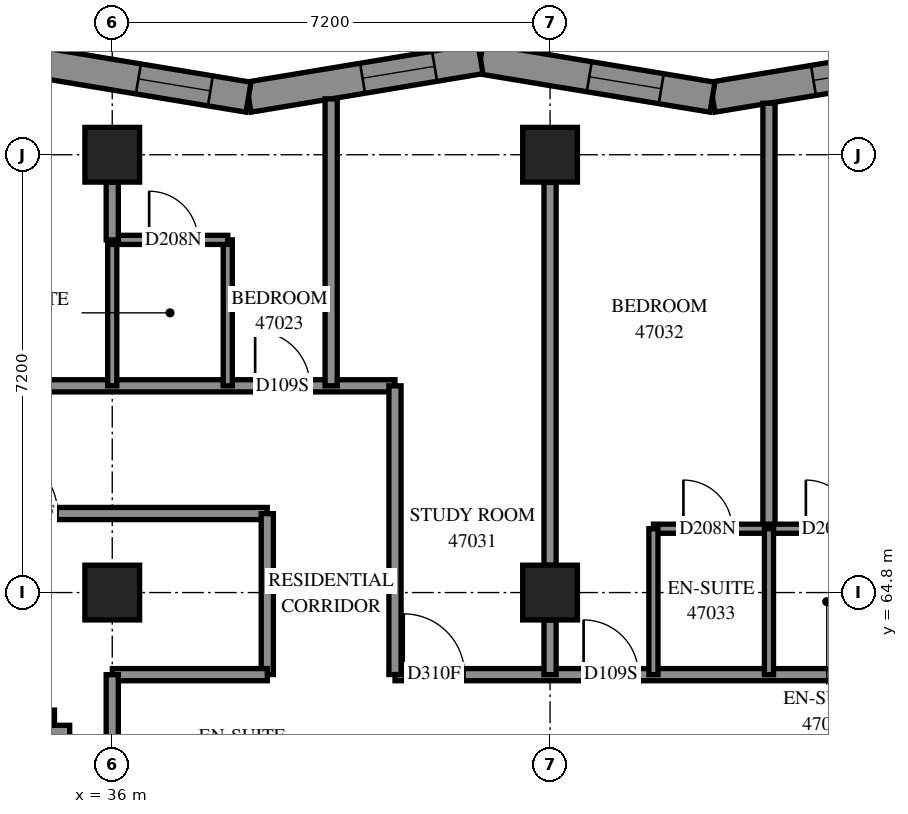
"""IFC4 building model, lengths in metres.
Left out: names, types, materials, properties, quantities, classifications, styles, units other than length and angle.
Written with IfcOpenShell. Run it as: python <this file> out.ifc"""

import sys

from ifc_helpers import new_model, si_unit, direction, frame, frame_2d, origin, origin_2d, place, context, subcontext, project, spatial, polyline, rectangle, outline, extrude, element, fill, save


model = new_model("IFC4")
c1 = context("Model", 3, precision=1e-05, world=origin(), true_north=direction((0.0, 1.0)))
c2 = subcontext(c1, "Body", "Model", "MODEL_VIEW")
j1 = project(units=[si_unit("LENGTHUNIT", "METRE"), si_unit("PLANEANGLEUNIT", "RADIAN")], contexts=[c1])
p1 = place(None, origin())
s1 = spatial("IfcSite", under=j1, at=p1, CompositionType="ELEMENT")
p2 = place(p1, origin())
s2 = spatial("IfcBuilding", under=s1, at=p2, CompositionType="ELEMENT")
p3 = place(p2, frame((0.0, 0.0, 172.8)))
s3 = spatial("IfcBuildingStorey", under=s2, at=p3, CompositionType="ELEMENT", Elevation=172.8)
for number, where, z_axis, x_axis in (
    (1, (36.0, 64.8, 0.0), (0.0, 0.0, 1.0), (1.0, 0.0, 0.0)),
    (2, (36.0, 72.0, 0.0), (0.0, 0.0, 1.0), (1.0, 0.0, 0.0)),
    (3, (43.2, 64.8, 0.0), (0.0, 0.0, 1.0), (1.0, 0.0, 0.0)),
    (4, (43.2, 72.0, 0.0), (0.0, 0.0, 1.0), (1.0, 0.0, 0.0)),
):
    element("IfcColumn", number, at=place(p3, frame(where, z_axis=z_axis, x_axis=x_axis)), inside=s3, PredefinedType="COLUMN", context=c2, shape_type="SweptSolid", body=[
        extrude(rectangle(XDim=0.9, YDim=0.9, at=origin_2d()), origin(), (0.0, 0.0, 1.0), 3.1),
    ])
p4 = place(p3, frame((49.685, 73.58, 0.0), z_axis=(0.0, 0.0, 1.0), x_axis=(-0.9865110911, -0.1636944324, 0.0)))
e5 = element("IfcWall", 5, at=p4, inside=s3, PredefinedType="SOLIDWALL", context=c2, shape_type="SweptSolid", body=[
    extrude(outline(polyline([(-0.042, -0.25), (3.825, -0.25), (3.908, 0.25), (0.042, 0.25), (-0.042, -0.25)])), origin(), (0.0, 0.0, 1.0), 3.1),
])
p5 = place(p4, frame((0.983, 0.0, 0.45)))
e6 = element("IfcOpeningElement", 6, at=p5, cuts=e5, PredefinedType="OPENING", context=c2, shape_type="SweptSolid", body=[
    extrude(rectangle(XDim=1.2, YDim=2.5, at=frame_2d((0.6, 1.25))), frame((0.0, 0.26, 0.0), z_axis=(0.0, -1.0, 0.0), x_axis=(1.0, 0.0, 0.0)), (0.0, 0.0, 1.0), 0.52),
])
p6 = place(p3, frame((45.87, 72.947, 0.0), z_axis=(0.0, 0.0, 1.0), x_axis=(-0.9865110911, 0.1636944324, 0.0)))
e7 = element("IfcWall", 7, at=p6, inside=s3, PredefinedType="SOLIDWALL", context=c2, shape_type="SweptSolid", body=[
    extrude(outline(polyline([(0.042, -0.25), (3.908, -0.25), (3.825, 0.25), (-0.042, 0.25), (0.042, -0.25)])), origin(), (0.0, 0.0, 1.0), 3.1),
])
p7 = place(p6, frame((0.854, 0.0, 0.45)))
e8 = element("IfcOpeningElement", 8, at=p7, cuts=e7, PredefinedType="OPENING", context=c2, shape_type="SweptSolid", body=[
    extrude(rectangle(XDim=1.2, YDim=2.5, at=frame_2d((0.6, 1.25))), frame((0.0, 0.26, 0.0), z_axis=(0.0, -1.0, 0.0), x_axis=(1.0, 0.0, 0.0)), (0.0, 0.0, 1.0), 0.52),
])
p8 = place(p3, frame((42.056, 73.58, 0.0), z_axis=(0.0, 0.0, 1.0), x_axis=(-0.9865110911, -0.1636944324, 0.0)))
e9 = element("IfcWall", 9, at=p8, inside=s3, PredefinedType="SOLIDWALL", context=c2, shape_type="SweptSolid", body=[
    extrude(outline(polyline([(-0.042, -0.25), (3.825, -0.25), (3.908, 0.25), (0.042, 0.25), (-0.042, -0.25)])), origin(), (0.0, 0.0, 1.0), 3.1),
])
p9 = place(p8, frame((0.765, 0.0, 0.45)))
e10 = element("IfcOpeningElement", 10, at=p9, cuts=e9, PredefinedType="OPENING", context=c2, shape_type="SweptSolid", body=[
    extrude(rectangle(XDim=1.2, YDim=2.5, at=frame_2d((0.6, 1.25))), frame((0.0, 0.26, 0.0), z_axis=(0.0, -1.0, 0.0), x_axis=(1.0, 0.0, 0.0)), (0.0, 0.0, 1.0), 0.52),
])
p10 = place(p3, frame((38.241, 72.947, 0.0), z_axis=(0.0, 0.0, 1.0), x_axis=(-0.9865110911, 0.1636944324, 0.0)))
e11 = element("IfcWall", 11, at=p10, inside=s3, PredefinedType="SOLIDWALL", context=c2, shape_type="SweptSolid", body=[
    extrude(outline(polyline([(0.042, -0.25), (3.908, -0.25), (3.825, 0.25), (-0.042, 0.25), (0.042, -0.25)])), origin(), (0.0, 0.0, 1.0), 3.1),
])
p11 = place(p10, frame((0.636, 0.0, 0.45)))
e12 = element("IfcOpeningElement", 12, at=p11, cuts=e11, PredefinedType="OPENING", context=c2, shape_type="SweptSolid", body=[
    extrude(rectangle(XDim=1.2, YDim=2.5, at=frame_2d((0.6, 1.25))), frame((0.0, 0.26, 0.0), z_axis=(0.0, -1.0, 0.0), x_axis=(1.0, 0.0, 0.0)), (0.0, 0.0, 1.0), 0.52),
])
p12 = place(p3, frame((19.417, 62.617, 0.0), z_axis=(0.0, 0.0, 1.0), x_axis=(1.0, 0.0, 0.0)))
e13 = element("IfcWall", 13, at=p12, inside=s3, PredefinedType="SOLIDWALL", context=c2, shape_type="SweptSolid", body=[
    extrude(outline(polyline([(-0.25, -0.25), (15.383, -0.25), (15.883, 0.25), (0.25, 0.25), (-0.25, -0.25)])), origin(), (0.0, 0.0, 1.0), 3.1),
])
p13 = place(p12, frame((2.583, 0.0, 0.45)))
e14 = element("IfcOpeningElement", 14, at=p13, cuts=e13, PredefinedType="OPENING", context=c2, shape_type="SweptSolid", body=[
    extrude(rectangle(XDim=2.8, YDim=2.5, at=frame_2d((1.4, 1.25))), frame((0.0, 0.26, 0.0), z_axis=(0.0, -1.0, 0.0), x_axis=(1.0, 0.0, 0.0)), (0.0, 0.0, 1.0), 0.52),
])
p14 = place(p12, frame((6.183, 0.0, 0.45)))
e15 = element("IfcOpeningElement", 15, at=p14, cuts=e13, PredefinedType="OPENING", context=c2, shape_type="SweptSolid", body=[
    extrude(rectangle(XDim=2.8, YDim=2.5, at=frame_2d((1.4, 1.25))), frame((0.0, 0.26, 0.0), z_axis=(0.0, -1.0, 0.0), x_axis=(1.0, 0.0, 0.0)), (0.0, 0.0, 1.0), 0.52),
])
p15 = place(p12, frame((0.717, 0.0, 0.45)))
e16 = element("IfcOpeningElement", 16, at=p15, cuts=e13, PredefinedType="OPENING", context=c2, shape_type="SweptSolid", body=[
    extrude(rectangle(XDim=1.2, YDim=2.5, at=frame_2d((0.6, 1.25))), frame((0.0, 0.26, 0.0), z_axis=(0.0, -1.0, 0.0), x_axis=(1.0, 0.0, 0.0)), (0.0, 0.0, 1.0), 0.52),
])
p16 = place(p12, frame((13.608, 0.0, 0.45)))
e17 = element("IfcOpeningElement", 17, at=p16, cuts=e13, PredefinedType="OPENING", context=c2, shape_type="SweptSolid", body=[
    extrude(rectangle(XDim=1.2, YDim=2.5, at=frame_2d((0.6, 1.25))), frame((0.0, 0.26, 0.0), z_axis=(0.0, -1.0, 0.0), x_axis=(1.0, 0.0, 0.0)), (0.0, 0.0, 1.0), 0.52),
])
p17 = place(p12, frame((9.608, 0.0, 0.45)))
e18 = element("IfcOpeningElement", 18, at=p17, cuts=e13, PredefinedType="OPENING", context=c2, shape_type="SweptSolid", body=[
    extrude(rectangle(XDim=1.3, YDim=2.5, at=frame_2d((0.65, 1.25))), frame((0.0, 0.26, 0.0), z_axis=(0.0, -1.0, 0.0), x_axis=(1.0, 0.0, 0.0)), (0.0, 0.0, 1.0), 0.52),
])
p18 = place(p12, frame((11.258, 0.0, 0.45)))
e19 = element("IfcOpeningElement", 19, at=p18, cuts=e13, PredefinedType="OPENING", context=c2, shape_type="SweptSolid", body=[
    extrude(rectangle(XDim=1.0, YDim=2.5, at=frame_2d((0.5, 1.25))), frame((0.0, 0.26, 0.0), z_axis=(0.0, -1.0, 0.0), x_axis=(1.0, 0.0, 0.0)), (0.0, 0.0, 1.0), 0.52),
])
p19 = place(p3, frame((35.05, 62.617, 0.0), z_axis=(0.0, 0.0, 1.0), x_axis=(0.0, -1.0, 0.0)))
e20 = element("IfcWall", 20, at=p19, inside=s3, PredefinedType="SOLIDWALL", context=c2, shape_type="SweptSolid", body=[
    extrude(outline(polyline([(0.25, -0.25), (6.217, -0.25), (5.717, 0.25), (-0.25, 0.25), (0.25, -0.25)])), origin(), (0.0, 0.0, 1.0), 3.1),
])
p20 = place(p19, frame((2.042, 0.0, 0.45)))
e21 = element("IfcOpeningElement", 21, at=p20, cuts=e20, PredefinedType="OPENING", context=c2, shape_type="SweptSolid", body=[
    extrude(rectangle(XDim=1.3, YDim=2.5, at=frame_2d((0.65, 1.25))), frame((0.0, 0.26, 0.0), z_axis=(0.0, -1.0, 0.0), x_axis=(1.0, 0.0, 0.0)), (0.0, 0.0, 1.0), 0.52),
])
p21 = place(p19, frame((3.792, 0.0, 0.45)))
e22 = element("IfcOpeningElement", 22, at=p21, cuts=e20, PredefinedType="OPENING", context=c2, shape_type="SweptSolid", body=[
    extrude(rectangle(XDim=0.8, YDim=2.5, at=frame_2d((0.4, 1.25))), frame((0.0, 0.26, 0.0), z_axis=(0.0, -1.0, 0.0), x_axis=(1.0, 0.0, 0.0)), (0.0, 0.0, 1.0), 0.52),
])
p22 = place(p3, frame((21.602, 68.2, 0.0), z_axis=(0.0, 0.0, 1.0), x_axis=(1.0, 0.0, 0.0)))
e23 = element("IfcWall", 23, at=p22, inside=s3, PredefinedType="PARTITIONING", context=c2, shape_type="SweptSolid", body=[
    extrude(rectangle(XDim=19.048, YDim=0.2, at=frame_2d((9.524, 0.0))), origin(), (0.0, 0.0, 1.0), 3.1),
])
p23 = place(p22, frame((3.998, 0.0, 0.0)))
e24 = element("IfcOpeningElement", 24, at=p23, cuts=e23, PredefinedType="OPENING", context=c2, shape_type="SweptSolid", body=[
    extrude(rectangle(XDim=0.9, YDim=2.1, at=frame_2d((0.45, 1.05))), frame((0.0, 0.11, 0.0), z_axis=(0.0, -1.0, 0.0), x_axis=(1.0, 0.0, 0.0)), (0.0, 0.0, 1.0), 0.22),
])
p24 = place(p22, frame((11.084, 0.0, 0.0)))
e25 = element("IfcOpeningElement", 25, at=p24, cuts=e23, PredefinedType="OPENING", context=c2, shape_type="SweptSolid", body=[
    extrude(rectangle(XDim=1.0, YDim=2.1, at=frame_2d((0.5, 1.05))), frame((0.0, 0.11, 0.0), z_axis=(0.0, -1.0, 0.0), x_axis=(1.0, 0.0, 0.0)), (0.0, 0.0, 1.0), 0.22),
])
p25 = place(p22, frame((16.748, 0.0, 0.0)))
e26 = element("IfcOpeningElement", 26, at=p25, cuts=e23, PredefinedType="OPENING", context=c2, shape_type="SweptSolid", body=[
    extrude(rectangle(XDim=0.9, YDim=2.1, at=frame_2d((0.45, 1.05))), frame((0.0, 0.11, 0.0), z_axis=(0.0, -1.0, 0.0), x_axis=(1.0, 0.0, 0.0)), (0.0, 0.0, 1.0), 0.22),
])
p26 = place(p3, frame((21.6, 66.1, 0.0), z_axis=(0.0, 0.0, 1.0), x_axis=(1.0, 0.0, 0.0)))
e27 = element("IfcWall", 27, at=p26, inside=s3, PredefinedType="PARTITIONING", context=c2, shape_type="SweptSolid", body=[
    extrude(rectangle(XDim=16.95, YDim=0.2, at=frame_2d((8.475, 0.0))), origin(), (0.0, 0.0, 1.0), 3.1),
])
p27 = place(p26, frame((0.546, 0.0, 0.0)))
e28 = element("IfcOpeningElement", 28, at=p27, cuts=e27, PredefinedType="OPENING", context=c2, shape_type="SweptSolid", body=[
    extrude(rectangle(XDim=0.9, YDim=2.1, at=frame_2d((0.45, 1.05))), frame((0.0, 0.11, 0.0), z_axis=(0.0, -1.0, 0.0), x_axis=(1.0, 0.0, 0.0)), (0.0, 0.0, 1.0), 0.22),
])
p28 = place(p26, frame((12.502, 0.0, 0.0)))
e29 = element("IfcOpeningElement", 29, at=p28, cuts=e27, PredefinedType="OPENING", context=c2, shape_type="SweptSolid", body=[
    extrude(rectangle(XDim=1.0, YDim=2.1, at=frame_2d((0.5, 1.05))), frame((0.0, 0.11, 0.0), z_axis=(0.0, -1.0, 0.0), x_axis=(1.0, 0.0, 0.0)), (0.0, 0.0, 1.0), 0.22),
])
p29 = place(p3, frame((40.65, 63.45, 0.0), z_axis=(0.0, 0.0, 1.0), x_axis=(1.0, 0.0, 0.0)))
e30 = element("IfcWall", 30, at=p29, inside=s3, PredefinedType="PARTITIONING", context=c2, shape_type="SweptSolid", body=[
    extrude(rectangle(XDim=9.75, YDim=0.2, at=frame_2d((4.875, 0.0))), origin(), (0.0, 0.0, 1.0), 3.1),
])
p30 = place(p29, frame((0.144, 0.0, 0.0)))
e31 = element("IfcOpeningElement", 31, at=p30, cuts=e30, PredefinedType="OPENING", context=c2, shape_type="SweptSolid", body=[
    extrude(rectangle(XDim=1.0, YDim=2.1, at=frame_2d((0.5, 1.05))), frame((0.0, 0.11, 0.0), z_axis=(0.0, -1.0, 0.0), x_axis=(1.0, 0.0, 0.0)), (0.0, 0.0, 1.0), 0.22),
])
p31 = place(p29, frame((3.102, 0.0, 0.0)))
e32 = element("IfcOpeningElement", 32, at=p31, cuts=e30, PredefinedType="OPENING", context=c2, shape_type="SweptSolid", body=[
    extrude(rectangle(XDim=0.9, YDim=2.1, at=frame_2d((0.45, 1.05))), frame((0.0, 0.11, 0.0), z_axis=(0.0, -1.0, 0.0), x_axis=(1.0, 0.0, 0.0)), (0.0, 0.0, 1.0), 0.22),
])
p32 = place(p29, frame((8.319, 0.0, 0.0)))
e33 = element("IfcOpeningElement", 33, at=p32, cuts=e30, PredefinedType="OPENING", context=c2, shape_type="SweptSolid", body=[
    extrude(rectangle(XDim=0.9, YDim=2.1, at=frame_2d((0.45, 1.05))), frame((0.0, 0.11, 0.0), z_axis=(0.0, -1.0, 0.0), x_axis=(1.0, 0.0, 0.0)), (0.0, 0.0, 1.0), 0.22),
])
p33 = place(p3, frame((46.8, 65.85, 0.0), z_axis=(0.0, 0.0, 1.0), x_axis=(0.0, 1.0, 0.0)))
e34 = element("IfcWall", 34, at=p33, inside=s3, PredefinedType="PARTITIONING", context=c2, shape_type="SweptSolid", body=[
    extrude(rectangle(XDim=6.997, YDim=0.2, at=frame_2d((3.499, 0.0))), origin(), (0.0, 0.0, 1.0), 3.1),
])
p34 = place(p3, frame((43.2, 65.25, 0.0), z_axis=(0.0, 0.0, 1.0), x_axis=(0.0, 1.0, 0.0)))
e35 = element("IfcWall", 35, at=p34, inside=s3, PredefinedType="PARTITIONING", context=c2, shape_type="SweptSolid", body=[
    extrude(rectangle(XDim=6.3, YDim=0.2, at=frame_2d((3.15, 0.0))), origin(), (0.0, 0.0, 1.0), 3.1),
])
p35 = place(p3, frame((40.65, 63.452, 0.0), z_axis=(0.0, 0.0, 1.0), x_axis=(0.0, 1.0, 0.0)))
e36 = element("IfcWall", 36, at=p35, inside=s3, PredefinedType="PARTITIONING", context=c2, shape_type="SweptSolid", body=[
    extrude(rectangle(XDim=4.748, YDim=0.2, at=frame_2d((2.374, 0.0))), origin(), (0.0, 0.0, 1.0), 3.1),
])
p36 = place(p3, frame((39.6, 68.2, 0.0), z_axis=(0.0, 0.0, 1.0), x_axis=(0.0, 1.0, 0.0)))
e37 = element("IfcWall", 37, at=p36, inside=s3, PredefinedType="PARTITIONING", context=c2, shape_type="SweptSolid", body=[
    extrude(rectangle(XDim=4.719, YDim=0.2, at=frame_2d((2.359, 0.0))), origin(), (0.0, 0.0, 1.0), 3.1),
])
p37 = place(p3, frame((44.9, 65.85, 0.0), z_axis=(0.0, 0.0, 1.0), x_axis=(1.0, 0.0, 0.0)))
e38 = element("IfcWall", 38, at=p37, inside=s3, PredefinedType="PARTITIONING", context=c2, shape_type="SweptSolid", body=[
    extrude(rectangle(XDim=3.8, YDim=0.15, at=frame_2d((1.9, 0.0))), origin(), (0.0, 0.0, 1.0), 3.1),
])
p38 = place(p37, frame((0.493, 0.0, 0.0)))
e39 = element("IfcOpeningElement", 39, at=p38, cuts=e38, PredefinedType="OPENING", context=c2, shape_type="SweptSolid", body=[
    extrude(rectangle(XDim=0.8, YDim=2.1, at=frame_2d((0.4, 1.05))), frame((0.0, 0.085, 0.0), z_axis=(0.0, -1.0, 0.0), x_axis=(1.0, 0.0, 0.0)), (0.0, 0.0, 1.0), 0.17),
])
p39 = place(p37, frame((2.507, 0.0, 0.0)))
e40 = element("IfcOpeningElement", 40, at=p39, cuts=e38, PredefinedType="OPENING", context=c2, shape_type="SweptSolid", body=[
    extrude(rectangle(XDim=0.8, YDim=2.1, at=frame_2d((0.4, 1.05))), frame((0.0, 0.085, 0.0), z_axis=(0.0, -1.0, 0.0), x_axis=(1.0, 0.0, 0.0)), (0.0, 0.0, 1.0), 0.17),
])
p40 = place(p3, frame((38.55, 63.452, 0.0), z_axis=(0.0, 0.0, 1.0), x_axis=(0.0, 1.0, 0.0)))
e41 = element("IfcWall", 41, at=p40, inside=s3, PredefinedType="PARTITIONING", context=c2, shape_type="SweptSolid", body=[
    extrude(rectangle(XDim=2.646, YDim=0.2, at=frame_2d((1.323, 0.0))), origin(), (0.0, 0.0, 1.0), 3.1),
])
p41 = place(p3, frame((36.002, 63.45, 0.0), z_axis=(0.0, 0.0, 1.0), x_axis=(1.0, 0.0, 0.0)))
e42 = element("IfcWall", 42, at=p41, inside=s3, PredefinedType="PARTITIONING", context=c2, shape_type="SweptSolid", body=[
    extrude(rectangle(XDim=2.548, YDim=0.2, at=frame_2d((1.274, 0.0))), origin(), (0.0, 0.0, 1.0), 3.1),
])
for number, where, z_axis, x_axis in (
    (43, (37.9, 68.2, 0.0), (0.0, 0.0, 1.0), (0.0, 1.0, 0.0)),
    (44, (36.0, 68.2, 0.0), (0.0, 0.0, 1.0), (0.0, 1.0, 0.0)),
    (45, (44.9, 63.45, 0.0), (0.0, 0.0, 1.0), (0.0, 1.0, 0.0)),
    (46, (46.8, 63.45, 0.0), (0.0, 0.0, 1.0), (0.0, 1.0, 0.0)),
):
    element("IfcWall", number, at=place(p3, frame(where, z_axis=z_axis, x_axis=x_axis)), inside=s3, PredefinedType="PARTITIONING", context=c2, shape_type="SweptSolid", body=[
        extrude(rectangle(XDim=2.4, YDim=0.15, at=frame_2d((1.2, 0.0))), origin(), (0.0, 0.0, 1.0), 3.1),
    ])
p42 = place(p3, frame((36.0, 61.35, 0.0), z_axis=(0.0, 0.0, 1.0), x_axis=(0.0, 1.0, 0.0)))
e47 = element("IfcWall", 47, at=p42, inside=s3, PredefinedType="PARTITIONING", context=c2, shape_type="SweptSolid", body=[
    extrude(rectangle(XDim=2.1, YDim=0.2, at=frame_2d((1.05, 0.0))), origin(), (0.0, 0.0, 1.0), 2.6),
])
p43 = place(p3, frame((36.0, 70.6, 0.0), z_axis=(0.0, 0.0, 1.0), x_axis=(1.0, 0.0, 0.0)))
e48 = element("IfcWall", 48, at=p43, inside=s3, PredefinedType="PARTITIONING", context=c2, shape_type="SweptSolid", body=[
    extrude(rectangle(XDim=1.9, YDim=0.15, at=frame_2d((0.95, 0.0))), origin(), (0.0, 0.0, 1.0), 3.1),
])
p44 = place(p43, frame((0.607, 0.0, 0.0)))
e49 = element("IfcOpeningElement", 49, at=p44, cuts=e48, PredefinedType="OPENING", context=c2, shape_type="SweptSolid", body=[
    extrude(rectangle(XDim=0.8, YDim=2.1, at=frame_2d((0.4, 1.05))), frame((0.0, 0.085, 0.0), z_axis=(0.0, -1.0, 0.0), x_axis=(1.0, 0.0, 0.0)), (0.0, 0.0, 1.0), 0.17),
])
p45 = place(p3, frame((36.0, 70.6, 0.0), z_axis=(0.0, 0.0, 1.0), x_axis=(0.0, 1.0, 0.0)))
e50 = element("IfcWall", 50, at=p45, inside=s3, PredefinedType="PARTITIONING", context=c2, shape_type="SweptSolid", body=[
    extrude(rectangle(XDim=0.95, YDim=0.2, at=frame_2d((0.475, 0.0))), origin(), (0.0, 0.0, 1.0), 3.1),
])
p46 = place(p3, frame((43.2, 63.45, 0.0), z_axis=(0.0, 0.0, 1.0), x_axis=(0.0, 1.0, 0.0)))
e51 = element("IfcWall", 51, at=p46, inside=s3, PredefinedType="PARTITIONING", context=c2, shape_type="SweptSolid", body=[
    extrude(rectangle(XDim=0.9, YDim=0.2, at=frame_2d((0.45, 0.0))), origin(), (0.0, 0.0, 1.0), 3.1),
])
p47 = place(p5, origin())
e52 = element("IfcWindow", 52, at=p47, inside=s3, PartitioningType="SINGLE_PANEL", PredefinedType="WINDOW", context=c2, shape_type="SweptSolid", body=[
    extrude(rectangle(XDim=1.2, YDim=2.5, at=frame_2d((0.6, 1.25))), frame((0.0, 0.18, 0.0), z_axis=(0.0, -1.0, 0.0), x_axis=(1.0, 0.0, 0.0)), (0.0, 0.0, 1.0), 0.06),
])
fill(e6, e52)
p48 = place(p7, origin())
e53 = element("IfcWindow", 53, at=p48, inside=s3, PartitioningType="SINGLE_PANEL", PredefinedType="WINDOW", context=c2, shape_type="SweptSolid", body=[
    extrude(rectangle(XDim=1.2, YDim=2.5, at=frame_2d((0.6, 1.25))), frame((0.0, 0.18, 0.0), z_axis=(0.0, -1.0, 0.0), x_axis=(1.0, 0.0, 0.0)), (0.0, 0.0, 1.0), 0.06),
])
fill(e8, e53)
p49 = place(p9, origin())
e54 = element("IfcWindow", 54, at=p49, inside=s3, PartitioningType="SINGLE_PANEL", PredefinedType="WINDOW", context=c2, shape_type="SweptSolid", body=[
    extrude(rectangle(XDim=1.2, YDim=2.5, at=frame_2d((0.6, 1.25))), frame((0.0, 0.18, 0.0), z_axis=(0.0, -1.0, 0.0), x_axis=(1.0, 0.0, 0.0)), (0.0, 0.0, 1.0), 0.06),
])
fill(e10, e54)
p50 = place(p11, origin())
e55 = element("IfcWindow", 55, at=p50, inside=s3, PartitioningType="SINGLE_PANEL", PredefinedType="WINDOW", context=c2, shape_type="SweptSolid", body=[
    extrude(rectangle(XDim=1.2, YDim=2.5, at=frame_2d((0.6, 1.25))), frame((0.0, 0.18, 0.0), z_axis=(0.0, -1.0, 0.0), x_axis=(1.0, 0.0, 0.0)), (0.0, 0.0, 1.0), 0.06),
])
fill(e12, e55)
p51 = place(p25, origin())
e56 = element("IfcDoor", 56, at=p51, inside=s3, OperationType="SINGLE_SWING_RIGHT", PredefinedType="DOOR", context=c2, shape_type="SweptSolid", body=[
    extrude(rectangle(XDim=0.9, YDim=2.1, at=frame_2d((0.45, 1.05))), frame((0.0, 0.025, 0.0), z_axis=(0.0, -1.0, 0.0), x_axis=(1.0, 0.0, 0.0)), (0.0, 0.0, 1.0), 0.05),
])
fill(e26, e56)
p52 = place(p44, origin())
e57 = element("IfcDoor", 57, at=p52, inside=s3, OperationType="SINGLE_SWING_RIGHT", PredefinedType="DOOR", context=c2, shape_type="SweptSolid", body=[
    extrude(rectangle(XDim=0.8, YDim=2.1, at=frame_2d((0.4, 1.05))), frame((0.0, 0.025, 0.0), z_axis=(0.0, -1.0, 0.0), x_axis=(1.0, 0.0, 0.0)), (0.0, 0.0, 1.0), 0.05),
])
fill(e49, e57)
p53 = place(p28, origin())
e58 = element("IfcDoor", 58, at=p53, inside=s3, OperationType="SINGLE_SWING_RIGHT", PredefinedType="DOOR", context=c2, shape_type="SweptSolid", body=[
    extrude(rectangle(XDim=1.0, YDim=2.1, at=frame_2d((0.5, 1.05))), frame((0.0, 0.025, 0.0), z_axis=(0.0, -1.0, 0.0), x_axis=(1.0, 0.0, 0.0)), (0.0, 0.0, 1.0), 0.05),
])
fill(e29, e58)
p54 = place(p30, origin())
e59 = element("IfcDoor", 59, at=p54, inside=s3, OperationType="SINGLE_SWING_LEFT", PredefinedType="DOOR", context=c2, shape_type="SweptSolid", body=[
    extrude(rectangle(XDim=1.0, YDim=2.1, at=frame_2d((0.5, 1.05))), frame((0.0, 0.025, 0.0), z_axis=(0.0, -1.0, 0.0), x_axis=(1.0, 0.0, 0.0)), (0.0, 0.0, 1.0), 0.05),
])
fill(e31, e59)
p55 = place(p31, origin())
e60 = element("IfcDoor", 60, at=p55, inside=s3, OperationType="SINGLE_SWING_RIGHT", PredefinedType="DOOR", context=c2, shape_type="SweptSolid", body=[
    extrude(rectangle(XDim=0.9, YDim=2.1, at=frame_2d((0.45, 1.05))), frame((0.0, 0.025, 0.0), z_axis=(0.0, -1.0, 0.0), x_axis=(1.0, 0.0, 0.0)), (0.0, 0.0, 1.0), 0.05),
])
fill(e32, e60)
p56 = place(p38, origin())
e61 = element("IfcDoor", 61, at=p56, inside=s3, OperationType="SINGLE_SWING_RIGHT", PredefinedType="DOOR", context=c2, shape_type="SweptSolid", body=[
    extrude(rectangle(XDim=0.8, YDim=2.1, at=frame_2d((0.4, 1.05))), frame((0.0, 0.025, 0.0), z_axis=(0.0, -1.0, 0.0), x_axis=(1.0, 0.0, 0.0)), (0.0, 0.0, 1.0), 0.05),
])
fill(e39, e61)
p57 = place(p39, origin())
e62 = element("IfcDoor", 62, at=p57, inside=s3, OperationType="SINGLE_SWING_RIGHT", PredefinedType="DOOR", context=c2, shape_type="SweptSolid", body=[
    extrude(rectangle(XDim=0.8, YDim=2.1, at=frame_2d((0.4, 1.05))), frame((0.0, 0.025, 0.0), z_axis=(0.0, -1.0, 0.0), x_axis=(1.0, 0.0, 0.0)), (0.0, 0.0, 1.0), 0.05),
])
fill(e40, e62)
save(model, sys.argv[1])
